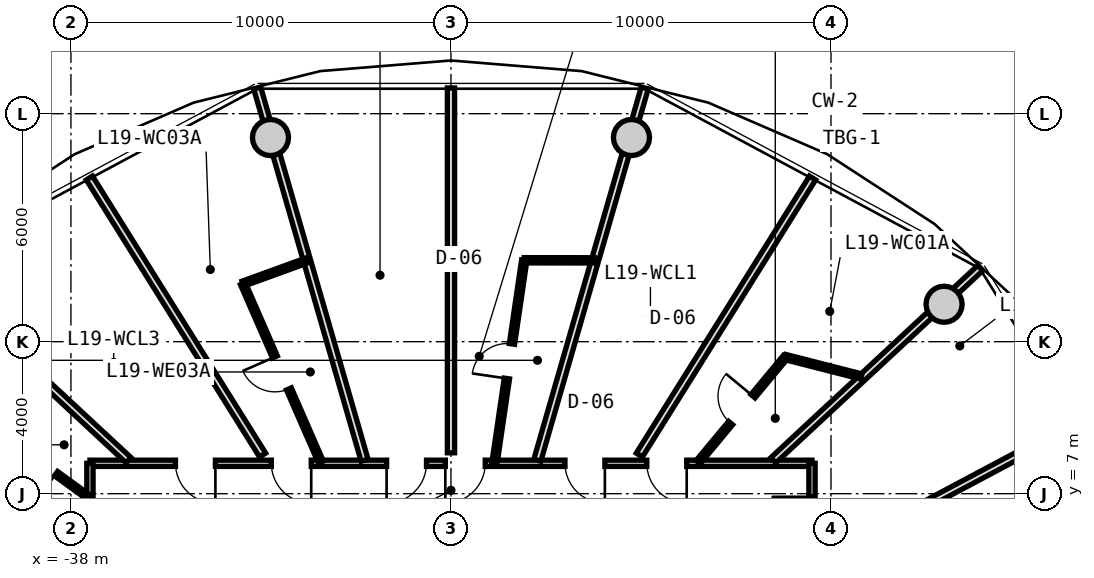
"""IFC4 building model, lengths in metres.
Left out: names, types, materials, properties, quantities, classifications, styles, units other than length and angle.
Written with IfcOpenShell. Run it as: python <this file> out.ifc"""

import sys

from ifc_helpers import new_model, si_unit, direction, frame, frame_2d, origin, origin_2d, place, context, subcontext, project, spatial, rectangle, circle, extrude, source, transform, mapped, element, fill, save


model = new_model("IFC4")
c1 = context("Model", 3, precision=1e-05, world=origin(), true_north=direction((0.0, 1.0)))
c2 = subcontext(c1, "Body", "Model", "MODEL_VIEW")
j1 = project(units=[si_unit("LENGTHUNIT", "METRE"), si_unit("PLANEANGLEUNIT", "RADIAN")], contexts=[c1])
p1 = place(None, origin())
s1 = spatial("IfcSite", under=j1, at=p1, CompositionType="ELEMENT")
p2 = place(p1, origin())
s2 = spatial("IfcBuilding", under=s1, at=p2, CompositionType="ELEMENT")
p3 = place(p2, frame((0.0, 0.0, 64.3)))
s3 = spatial("IfcBuildingStorey", under=s2, at=p3, CompositionType="ELEMENT", Elevation=64.3)
m1 = source(origin(), c2, "Body", "SweptSolid", [
    extrude(circle(Radius=0.475, at=origin_2d()), origin(), (0.0, 0.0, 1.0), 3.05),
])
for number, where, z_axis, x_axis in (
    (1, (-15.025, 11.985, 0.0), (0.0, 0.0, 1.0), (1.0, 0.0, 0.0)),
    (2, (-23.251, 16.373, 0.0), (0.0, 0.0, 1.0), (1.0, 0.0, 0.0)),
    (3, (-32.749, 16.373, 0.0), (0.0, 0.0, 1.0), (1.0, 0.0, 0.0)),
):
    element("IfcColumn", number, at=place(p3, frame(where, z_axis=z_axis, x_axis=x_axis)), inside=s3, PredefinedType="COLUMN", context=c2, shape_type="MappedRepresentation", body=[
        mapped(m1, transform((0.0, 0.0, 0.0), x_axis=(1.0, 0.0, 0.0), y_axis=(0.0, 1.0, 0.0), z_axis=(0.0, 0.0, 1.0), scale=1.0)),
    ])
m2 = source(origin(), c2, "Body", "SweptSolid", [
    extrude(rectangle(XDim=19.0, YDim=0.165, at=frame_2d((9.5, 0.0))), origin(), (0.0, 0.0, 1.0), 2.775),
])
p4 = place(p3, frame((-37.5, 7.8, 0.0), z_axis=(0.0, 0.0, 1.0), x_axis=(1.0, 0.0, 0.0)))
e4 = element("IfcWall", 4, at=p4, inside=s3, PredefinedType="PARTITIONING", context=c2, shape_type="MappedRepresentation", body=[
    mapped(m2, transform((0.0, 0.0, 0.0), x_axis=(1.0, 0.0, 0.0), y_axis=(0.0, 1.0, 0.0), z_axis=(0.0, 0.0, 1.0), scale=1.0)),
])
p5 = place(p4, frame((14.653, 0.0, 0.0)))
e5 = element("IfcOpeningElement", 5, at=p5, cuts=e4, PredefinedType="OPENING", context=c2, shape_type="SweptSolid", body=[
    extrude(rectangle(XDim=1.05, YDim=2.15, at=frame_2d((0.525, 1.075))), frame((0.0, 0.093, 0.0), z_axis=(0.0, -1.0, 0.0), x_axis=(1.0, 0.0, 0.0)), (0.0, 0.0, 1.0), 0.185),
])
p6 = place(p4, frame((12.5, 0.0, 0.0)))
e6 = element("IfcOpeningElement", 6, at=p6, cuts=e4, PredefinedType="OPENING", context=c2, shape_type="SweptSolid", body=[
    extrude(rectangle(XDim=1.05, YDim=2.15, at=frame_2d((0.525, 1.075))), frame((0.0, 0.093, 0.0), z_axis=(0.0, -1.0, 0.0), x_axis=(1.0, 0.0, 0.0)), (0.0, 0.0, 1.0), 0.185),
])
p7 = place(p4, frame((9.352, 0.0, 0.0)))
e7 = element("IfcOpeningElement", 7, at=p7, cuts=e4, PredefinedType="OPENING", context=c2, shape_type="SweptSolid", body=[
    extrude(rectangle(XDim=1.05, YDim=2.15, at=frame_2d((0.525, 1.075))), frame((0.0, 0.093, 0.0), z_axis=(0.0, -1.0, 0.0), x_axis=(1.0, 0.0, 0.0)), (0.0, 0.0, 1.0), 0.185),
])
p8 = place(p4, frame((7.806, 0.0, 0.0)))
e8 = element("IfcOpeningElement", 8, at=p8, cuts=e4, PredefinedType="OPENING", context=c2, shape_type="SweptSolid", body=[
    extrude(rectangle(XDim=1.05, YDim=2.15, at=frame_2d((0.525, 1.075))), frame((0.0, 0.093, 0.0), z_axis=(0.0, -1.0, 0.0), x_axis=(1.0, 0.0, 0.0)), (0.0, 0.0, 1.0), 0.185),
])
p9 = place(p4, frame((4.773, 0.0, 0.0)))
e9 = element("IfcOpeningElement", 9, at=p9, cuts=e4, PredefinedType="OPENING", context=c2, shape_type="SweptSolid", body=[
    extrude(rectangle(XDim=1.05, YDim=2.15, at=frame_2d((0.525, 1.075))), frame((0.0, 0.093, 0.0), z_axis=(0.0, -1.0, 0.0), x_axis=(1.0, 0.0, 0.0)), (0.0, 0.0, 1.0), 0.185),
])
p10 = place(p4, frame((2.251, 0.0, 0.0)))
e10 = element("IfcOpeningElement", 10, at=p10, cuts=e4, PredefinedType="OPENING", context=c2, shape_type="SweptSolid", body=[
    extrude(rectangle(XDim=1.05, YDim=2.15, at=frame_2d((0.525, 1.075))), frame((0.0, 0.093, 0.0), z_axis=(0.0, -1.0, 0.0), x_axis=(1.0, 0.0, 0.0)), (0.0, 0.0, 1.0), 0.185),
])
m3 = source(origin(), c2, "Body", "SweptSolid", [
    extrude(rectangle(XDim=15.6, YDim=0.165, at=frame_2d((7.8, 0.0))), origin(), (0.0, 0.0, 1.0), 2.775),
])
p11 = place(p3, frame((-37.5, -7.8, 0.0), z_axis=(0.0, 0.0, 1.0), x_axis=(0.0, 1.0, 0.0)))
e11 = element("IfcWall", 11, at=p11, inside=s3, PredefinedType="PARTITIONING", context=c2, shape_type="MappedRepresentation", body=[
    mapped(m3, transform((0.0, 0.0, 0.0), x_axis=(1.0, 0.0, 0.0), y_axis=(0.0, 1.0, 0.0), z_axis=(0.0, 0.0, 1.0), scale=1.0)),
])
p12 = place(p11, frame((7.812, 0.0, 0.0)))
e12 = element("IfcOpeningElement", 12, at=p12, cuts=e11, PredefinedType="OPENING", context=c2, shape_type="SweptSolid", body=[
    extrude(rectangle(XDim=1.05, YDim=2.15, at=frame_2d((0.525, 1.075))), frame((0.0, 0.093, 0.0), z_axis=(0.0, -1.0, 0.0), x_axis=(1.0, 0.0, 0.0)), (0.0, 0.0, 1.0), 0.185),
])
p13 = place(p11, frame((6.035, 0.0, 0.0)))
e13 = element("IfcOpeningElement", 13, at=p13, cuts=e11, PredefinedType="OPENING", context=c2, shape_type="SweptSolid", body=[
    extrude(rectangle(XDim=1.05, YDim=2.15, at=frame_2d((0.525, 1.075))), frame((0.0, 0.093, 0.0), z_axis=(0.0, -1.0, 0.0), x_axis=(1.0, 0.0, 0.0)), (0.0, 0.0, 1.0), 0.185),
])
p14 = place(p11, frame((2.826, 0.0, 0.0)))
e14 = element("IfcOpeningElement", 14, at=p14, cuts=e11, PredefinedType="OPENING", context=c2, shape_type="SweptSolid", body=[
    extrude(rectangle(XDim=1.05, YDim=2.15, at=frame_2d((0.525, 1.075))), frame((0.0, 0.093, 0.0), z_axis=(0.0, -1.0, 0.0), x_axis=(1.0, 0.0, 0.0)), (0.0, 0.0, 1.0), 0.185),
])
p15 = place(p11, frame((0.881, 0.0, 0.0)))
e15 = element("IfcOpeningElement", 15, at=p15, cuts=e11, PredefinedType="OPENING", context=c2, shape_type="SweptSolid", body=[
    extrude(rectangle(XDim=1.05, YDim=2.15, at=frame_2d((0.525, 1.075))), frame((0.0, 0.093, 0.0), z_axis=(0.0, -1.0, 0.0), x_axis=(1.0, 0.0, 0.0)), (0.0, 0.0, 1.0), 0.185),
])
p16 = place(p11, frame((13.293, 0.0, 0.0)))
e16 = element("IfcOpeningElement", 16, at=p16, cuts=e11, PredefinedType="OPENING", context=c2, shape_type="SweptSolid", body=[
    extrude(rectangle(XDim=1.05, YDim=2.15, at=frame_2d((0.525, 1.075))), frame((0.0, 0.093, 0.0), z_axis=(0.0, -1.0, 0.0), x_axis=(1.0, 0.0, 0.0)), (0.0, 0.0, 1.0), 0.185),
])
p17 = place(p11, frame((11.018, 0.0, 0.0)))
e17 = element("IfcOpeningElement", 17, at=p17, cuts=e11, PredefinedType="OPENING", context=c2, shape_type="SweptSolid", body=[
    extrude(rectangle(XDim=1.05, YDim=2.15, at=frame_2d((0.525, 1.075))), frame((0.0, 0.093, 0.0), z_axis=(0.0, -1.0, 0.0), x_axis=(1.0, 0.0, 0.0)), (0.0, 0.0, 1.0), 0.185),
])
p18 = place(p3, frame((-18.5, 7.8, 0.0), z_axis=(0.0, 0.0, 1.0), x_axis=(0.0, -1.0, 0.0)))
e18 = element("IfcWall", 18, at=p18, inside=s3, PredefinedType="PARTITIONING", context=c2, shape_type="MappedRepresentation", body=[
    mapped(m3, transform((0.0, 0.0, 0.0), x_axis=(1.0, 0.0, 0.0), y_axis=(0.0, 1.0, 0.0), z_axis=(0.0, 0.0, 1.0), scale=1.0)),
])
p19 = place(p18, frame((12.141, 0.0, 0.0)))
e19 = element("IfcOpeningElement", 19, at=p19, cuts=e18, PredefinedType="OPENING", context=c2, shape_type="SweptSolid", body=[
    extrude(rectangle(XDim=1.25, YDim=2.2, at=frame_2d((0.625, 1.1))), frame((0.0, 0.093, 0.0), z_axis=(0.0, -1.0, 0.0), x_axis=(1.0, 0.0, 0.0)), (0.0, 0.0, 1.0), 0.185),
])
p20 = place(p18, frame((7.175, 0.0, 0.0)))
e20 = element("IfcOpeningElement", 20, at=p20, cuts=e18, PredefinedType="OPENING", context=c2, shape_type="SweptSolid", body=[
    extrude(rectangle(XDim=1.25, YDim=2.2, at=frame_2d((0.625, 1.1))), frame((0.0, 0.093, 0.0), z_axis=(0.0, -1.0, 0.0), x_axis=(1.0, 0.0, 0.0)), (0.0, 0.0, 1.0), 0.185),
])
p21 = place(p18, frame((2.826, 0.0, 0.0)))
e21 = element("IfcOpeningElement", 21, at=p21, cuts=e18, PredefinedType="OPENING", context=c2, shape_type="SweptSolid", body=[
    extrude(rectangle(XDim=1.05, YDim=2.15, at=frame_2d((0.525, 1.075))), frame((0.0, 0.093, 0.0), z_axis=(0.0, -1.0, 0.0), x_axis=(1.0, 0.0, 0.0)), (0.0, 0.0, 1.0), 0.185),
])
p22 = place(p18, frame((0.881, 0.0, 0.0)))
e22 = element("IfcOpeningElement", 22, at=p22, cuts=e18, PredefinedType="OPENING", context=c2, shape_type="SweptSolid", body=[
    extrude(rectangle(XDim=1.05, YDim=2.15, at=frame_2d((0.525, 1.075))), frame((0.0, 0.093, 0.0), z_axis=(0.0, -1.0, 0.0), x_axis=(1.0, 0.0, 0.0)), (0.0, 0.0, 1.0), 0.185),
])
m4 = source(origin(), c2, "Body", "SweptSolid", [
    extrude(rectangle(XDim=7.435, YDim=0.19, at=frame_2d((3.717, 0.0))), origin(), (0.0, 0.0, 1.0), 2.225),
])
p23 = place(p3, frame((-19.517, 7.88, 0.0), z_axis=(0.0, 0.0, 1.0), x_axis=(0.732651956848, 0.680603489652, 0.0)))
e23 = element("IfcWall", 23, at=p23, inside=s3, PredefinedType="PARTITIONING", context=c2, shape_type="MappedRepresentation", body=[
    mapped(m4, transform((0.0, 0.0, 0.0), x_axis=(1.0, 0.0, 0.0), y_axis=(0.0, 1.0, 0.0), z_axis=(0.0, 0.0, 1.0), scale=1.0)),
])
m5 = source(origin(), c2, "Body", "SweptSolid", [
    extrude(rectangle(XDim=7.677, YDim=0.19, at=frame_2d((3.838, 0.0))), origin(), (0.0, 0.0, 1.0), 2.775),
])
p24 = place(p3, frame((-18.297, 5.231, 0.0), z_axis=(0.0, 0.0, 1.0), x_axis=(0.882725057546, 0.469889851753, 0.0)))
e24 = element("IfcWall", 24, at=p24, inside=s3, PredefinedType="PARTITIONING", context=c2, shape_type="MappedRepresentation", body=[
    mapped(m5, transform((0.0, 0.0, 0.0), x_axis=(1.0, 0.0, 0.0), y_axis=(0.0, 1.0, 0.0), z_axis=(0.0, 0.0, 1.0), scale=1.0)),
])
m6 = source(origin(), c2, "Body", "SweptSolid", [
    extrude(rectangle(XDim=10.196, YDim=0.19, at=frame_2d((5.098, 0.0))), origin(), (0.0, 0.0, 1.0), 2.225),
])
p25 = place(p3, frame((-25.727, 7.88, 0.0), z_axis=(0.0, 0.0, 1.0), x_axis=(0.277136420347, 0.960830580549, 0.0)))
e25 = element("IfcWall", 25, at=p25, inside=s3, PredefinedType="PARTITIONING", context=c2, shape_type="MappedRepresentation", body=[
    mapped(m6, transform((0.0, 0.0, 0.0), x_axis=(1.0, 0.0, 0.0), y_axis=(0.0, 1.0, 0.0), z_axis=(0.0, 0.0, 1.0), scale=1.0)),
])
m7 = source(origin(), c2, "Body", "SweptSolid", [
    extrude(rectangle(XDim=8.598, YDim=0.19, at=frame_2d((4.299, 0.0))), origin(), (0.0, 0.0, 1.0), 2.775),
])
p26 = place(p3, frame((-23.043, 8.017, 0.0), z_axis=(0.0, 0.0, 1.0), x_axis=(0.530039776395, 0.847972779893, 0.0)))
e26 = element("IfcWall", 26, at=p26, inside=s3, PredefinedType="PARTITIONING", context=c2, shape_type="MappedRepresentation", body=[
    mapped(m7, transform((0.0, 0.0, 0.0), x_axis=(1.0, 0.0, 0.0), y_axis=(0.0, 1.0, 0.0), z_axis=(0.0, 0.0, 1.0), scale=1.0)),
])
m8 = source(origin(), c2, "Body", "SweptSolid", [
    extrude(rectangle(XDim=3.594, YDim=0.14, at=frame_2d((1.797, 0.0))), origin(), (0.0, 0.0, 1.0), 2.775),
])
p27 = place(p3, frame((-21.496, 7.83, 0.0), z_axis=(0.0, 0.0, 1.0), x_axis=(0.639001147083, 0.769205781326, 0.0)))
e27 = element("IfcWall", 27, at=p27, inside=s3, PredefinedType="PARTITIONING", context=c2, shape_type="MappedRepresentation", body=[
    mapped(m8, transform((0.0, 0.0, 0.0), x_axis=(1.0, 0.0, 0.0), y_axis=(0.0, 1.0, 0.0), z_axis=(0.0, 0.0, 1.0), scale=1.0)),
])
p28 = place(p27, frame((1.337, 0.0, 0.0)))
e28 = element("IfcOpeningElement", 28, at=p28, cuts=e27, PredefinedType="OPENING", context=c2, shape_type="SweptSolid", body=[
    extrude(rectangle(XDim=0.92, YDim=2.1, at=frame_2d((0.46, 1.05))), frame((0.0, 0.08, 0.0), z_axis=(0.0, -1.0, 0.0), x_axis=(1.0, 0.0, 0.0)), (0.0, 0.0, 1.0), 0.16),
])
m9 = source(origin(), c2, "Body", "SweptSolid", [
    extrude(rectangle(XDim=2.062, YDim=0.14, at=frame_2d((1.031, 0.0))), origin(), (0.0, 0.0, 1.0), 2.415),
])
p29 = place(p3, frame((-19.199, 10.595, 0.0), z_axis=(0.0, 0.0, 1.0), x_axis=(0.968776253543, -0.247936626121, 0.0)))
e29 = element("IfcWall", 29, at=p29, inside=s3, PredefinedType="PARTITIONING", context=c2, shape_type="MappedRepresentation", body=[
    mapped(m9, transform((0.0, 0.0, 0.0), x_axis=(1.0, 0.0, 0.0), y_axis=(0.0, 1.0, 0.0), z_axis=(0.0, 0.0, 1.0), scale=1.0)),
])
p30 = place(p3, frame((-30.273, 7.88, 0.0), z_axis=(0.0, 0.0, 1.0), x_axis=(-0.277136420347, 0.960830580549, 0.0)))
e30 = element("IfcWall", 30, at=p30, inside=s3, PredefinedType="PARTITIONING", context=c2, shape_type="MappedRepresentation", body=[
    mapped(m6, transform((0.0, 0.0, 0.0), x_axis=(1.0, 0.0, 0.0), y_axis=(0.0, 1.0, 0.0), z_axis=(0.0, 0.0, 1.0), scale=1.0)),
])
m10 = source(origin(), c2, "Body", "SweptSolid", [
    extrude(rectangle(XDim=9.601, YDim=0.19, at=frame_2d((4.8, 0.0))), origin(), (0.0, 0.0, 1.0), 2.775),
])
p31 = place(p3, frame((-28.0, 8.076, 0.0), z_axis=(0.0, 0.0, 1.0), x_axis=(0.0, 1.0, 0.0)))
e31 = element("IfcWall", 31, at=p31, inside=s3, PredefinedType="PARTITIONING", context=c2, shape_type="MappedRepresentation", body=[
    mapped(m10, transform((0.0, 0.0, 0.0), x_axis=(1.0, 0.0, 0.0), y_axis=(0.0, 1.0, 0.0), z_axis=(0.0, 0.0, 1.0), scale=1.0)),
])
m11 = source(origin(), c2, "Body", "SweptSolid", [
    extrude(rectangle(XDim=5.37, YDim=0.14, at=frame_2d((2.685, 0.0))), origin(), (0.0, 0.0, 1.0), 2.775),
])
p32 = place(p3, frame((-26.851, 7.83, 0.0), z_axis=(0.0, 0.0, 1.0), x_axis=(0.145131397853, 0.989412389935, 0.0)))
e32 = element("IfcWall", 32, at=p32, inside=s3, PredefinedType="PARTITIONING", context=c2, shape_type="MappedRepresentation", body=[
    mapped(m11, transform((0.0, 0.0, 0.0), x_axis=(1.0, 0.0, 0.0), y_axis=(0.0, 1.0, 0.0), z_axis=(0.0, 0.0, 1.0), scale=1.0)),
])
p33 = place(p32, frame((2.225, 0.0, 0.0)))
e33 = element("IfcOpeningElement", 33, at=p33, cuts=e32, PredefinedType="OPENING", context=c2, shape_type="SweptSolid", body=[
    extrude(rectangle(XDim=0.92, YDim=2.1, at=frame_2d((0.46, 1.05))), frame((0.0, 0.08, 0.0), z_axis=(0.0, -1.0, 0.0), x_axis=(1.0, 0.0, 0.0)), (0.0, 0.0, 1.0), 0.16),
])
m12 = source(origin(), c2, "Body", "SweptSolid", [
    extrude(rectangle(XDim=1.843, YDim=0.14, at=frame_2d((0.921, 0.0))), origin(), (0.0, 0.0, 1.0), 2.775),
])
p34 = place(p3, frame((-26.072, 13.143, 0.0), z_axis=(0.0, 0.0, 1.0), x_axis=(0.999998937801, -0.001457531246, 0.0)))
e34 = element("IfcWall", 34, at=p34, inside=s3, PredefinedType="PARTITIONING", context=c2, shape_type="MappedRepresentation", body=[
    mapped(m12, transform((0.0, 0.0, 0.0), x_axis=(1.0, 0.0, 0.0), y_axis=(0.0, 1.0, 0.0), z_axis=(0.0, 0.0, 1.0), scale=1.0)),
])
p35 = place(p3, frame((-36.483, 7.88, 0.0), z_axis=(0.0, 0.0, 1.0), x_axis=(-0.732651956848, 0.680603489652, 0.0)))
e35 = element("IfcWall", 35, at=p35, inside=s3, PredefinedType="PARTITIONING", context=c2, shape_type="MappedRepresentation", body=[
    mapped(m4, transform((0.0, 0.0, 0.0), x_axis=(1.0, 0.0, 0.0), y_axis=(0.0, 1.0, 0.0), z_axis=(0.0, 0.0, 1.0), scale=1.0)),
])
p36 = place(p3, frame((-32.957, 8.017, 0.0), z_axis=(0.0, 0.0, 1.0), x_axis=(-0.530039776395, 0.847972779893, 0.0)))
e36 = element("IfcWall", 36, at=p36, inside=s3, PredefinedType="PARTITIONING", context=c2, shape_type="MappedRepresentation", body=[
    mapped(m7, transform((0.0, 0.0, 0.0), x_axis=(1.0, 0.0, 0.0), y_axis=(0.0, 1.0, 0.0), z_axis=(0.0, 0.0, 1.0), scale=1.0)),
])
m13 = source(origin(), c2, "Body", "SweptSolid", [
    extrude(rectangle(XDim=5.126, YDim=0.14, at=frame_2d((2.563, 0.0))), origin(), (0.0, 0.0, 1.0), 2.775),
])
p37 = place(p3, frame((-31.422, 7.83, 0.0), z_axis=(0.0, 0.0, 1.0), x_axis=(-0.400473994842, 0.916308124735, 0.0)))
e37 = element("IfcWall", 37, at=p37, inside=s3, PredefinedType="PARTITIONING", context=c2, shape_type="MappedRepresentation", body=[
    mapped(m13, transform((0.0, 0.0, 0.0), x_axis=(1.0, 0.0, 0.0), y_axis=(0.0, 1.0, 0.0), z_axis=(0.0, 0.0, 1.0), scale=1.0)),
])
p38 = place(p37, frame((2.103, 0.0, 0.0)))
e38 = element("IfcOpeningElement", 38, at=p38, cuts=e37, PredefinedType="OPENING", context=c2, shape_type="SweptSolid", body=[
    extrude(rectangle(XDim=0.92, YDim=2.1, at=frame_2d((0.46, 1.05))), frame((0.0, 0.08, 0.0), z_axis=(0.0, -1.0, 0.0), x_axis=(1.0, 0.0, 0.0)), (0.0, 0.0, 1.0), 0.16),
])
m14 = source(origin(), c2, "Body", "SweptSolid", [
    extrude(rectangle(XDim=1.811, YDim=0.14, at=frame_2d((0.906, 0.0))), origin(), (0.0, 0.0, 1.0), 2.775),
])
p39 = place(p3, frame((-33.475, 12.527, 0.0), z_axis=(0.0, 0.0, 1.0), x_axis=(0.940009682452, 0.341147764021, 0.0)))
e39 = element("IfcWall", 39, at=p39, inside=s3, PredefinedType="PARTITIONING", context=c2, shape_type="MappedRepresentation", body=[
    mapped(m14, transform((0.0, 0.0, 0.0), x_axis=(1.0, 0.0, 0.0), y_axis=(0.0, 1.0, 0.0), z_axis=(0.0, 0.0, 1.0), scale=1.0)),
])
p40 = place(p3, frame((-37.703, 5.231, 0.0), z_axis=(0.0, 0.0, 1.0), x_axis=(-0.882725057546, 0.469889851753, 0.0)))
e40 = element("IfcWall", 40, at=p40, inside=s3, PredefinedType="PARTITIONING", context=c2, shape_type="MappedRepresentation", body=[
    mapped(m5, transform((0.0, 0.0, 0.0), x_axis=(1.0, 0.0, 0.0), y_axis=(0.0, 1.0, 0.0), z_axis=(0.0, 0.0, 1.0), scale=1.0)),
])
m15 = source(origin(), c2, "Body", "SweptSolid", [
    extrude(rectangle(XDim=3.051, YDim=0.14, at=frame_2d((1.525, 0.0))), origin(), (0.0, 0.0, 1.0), 2.775),
])
p41 = place(p3, frame((-37.53, 6.903, 0.0), z_axis=(0.0, 0.0, 1.0), x_axis=(-0.809849031404, 0.586638343729, 0.0)))
e41 = element("IfcWall", 41, at=p41, inside=s3, PredefinedType="PARTITIONING", context=c2, shape_type="MappedRepresentation", body=[
    mapped(m15, transform((0.0, 0.0, 0.0), x_axis=(1.0, 0.0, 0.0), y_axis=(0.0, 1.0, 0.0), z_axis=(0.0, 0.0, 1.0), scale=1.0)),
])
p42 = place(p41, frame((1.065, 0.0, 0.0)))
e42 = element("IfcOpeningElement", 42, at=p42, cuts=e41, PredefinedType="OPENING", context=c2, shape_type="SweptSolid", body=[
    extrude(rectangle(XDim=0.92, YDim=2.1, at=frame_2d((0.46, 1.05))), frame((0.0, 0.08, 0.0), z_axis=(0.0, -1.0, 0.0), x_axis=(1.0, 0.0, 0.0)), (0.0, 0.0, 1.0), 0.16),
])
m16 = source(origin(), c2, "Body", "SweptSolid", [
    extrude(rectangle(XDim=1.05, YDim=2.15, at=frame_2d((0.525, 1.075))), frame((0.0, 0.025, 0.0), z_axis=(0.0, -1.0, 0.0), x_axis=(1.0, 0.0, 0.0)), (0.0, 0.0, 1.0), 0.05),
])
p43 = place(p22, frame((1.05, 0.0, 0.0), z_axis=(0.0, 0.0, 1.0), x_axis=(-1.0, 0.0, 0.0)))
e43 = element("IfcDoor", 43, at=p43, inside=s3, OperationType="SINGLE_SWING_RIGHT", PredefinedType="DOOR", context=c2, shape_type="MappedRepresentation", body=[
    mapped(m16, transform((0.0, 0.0, 0.0), x_axis=(1.0, 0.0, 0.0), y_axis=(0.0, 1.0, 0.0), z_axis=(0.0, 0.0, 1.0), scale=1.0)),
])
fill(e22, e43)
p44 = place(p5, frame((1.05, 0.0, 0.0), z_axis=(0.0, 0.0, 1.0), x_axis=(-1.0, 0.0, 0.0)))
e44 = element("IfcDoor", 44, at=p44, inside=s3, OperationType="SINGLE_SWING_LEFT", PredefinedType="DOOR", context=c2, shape_type="MappedRepresentation", body=[
    mapped(m16, transform((0.0, 0.0, 0.0), x_axis=(1.0, 0.0, 0.0), y_axis=(0.0, 1.0, 0.0), z_axis=(0.0, 0.0, 1.0), scale=1.0)),
])
fill(e5, e44)
m17 = source(origin(), c2, "Body", "SweptSolid", [
    extrude(rectangle(XDim=0.92, YDim=2.1, at=frame_2d((0.46, 1.05))), frame((0.0, 0.025, 0.0), z_axis=(0.0, -1.0, 0.0), x_axis=(1.0, 0.0, 0.0)), (0.0, 0.0, 1.0), 0.05),
])
p45 = place(p28, origin())
e45 = element("IfcDoor", 45, at=p45, inside=s3, OperationType="SINGLE_SWING_RIGHT", PredefinedType="DOOR", context=c2, shape_type="MappedRepresentation", body=[
    mapped(m17, transform((0.0, 0.0, 0.0), x_axis=(1.0, 0.0, 0.0), y_axis=(0.0, 1.0, 0.0), z_axis=(0.0, 0.0, 1.0), scale=1.0)),
])
fill(e28, e45)
p46 = place(p6, frame((1.05, 0.0, 0.0), z_axis=(0.0, 0.0, 1.0), x_axis=(-1.0, 0.0, 0.0)))
e46 = element("IfcDoor", 46, at=p46, inside=s3, OperationType="SINGLE_SWING_LEFT", PredefinedType="DOOR", context=c2, shape_type="MappedRepresentation", body=[
    mapped(m16, transform((0.0, 0.0, 0.0), x_axis=(1.0, 0.0, 0.0), y_axis=(0.0, 1.0, 0.0), z_axis=(0.0, 0.0, 1.0), scale=1.0)),
])
fill(e6, e46)
p47 = place(p7, frame((1.05, 0.0, 0.0), z_axis=(0.0, 0.0, 1.0), x_axis=(-1.0, 0.0, 0.0)))
e47 = element("IfcDoor", 47, at=p47, inside=s3, OperationType="SINGLE_SWING_RIGHT", PredefinedType="DOOR", context=c2, shape_type="MappedRepresentation", body=[
    mapped(m16, transform((0.0, 0.0, 0.0), x_axis=(1.0, 0.0, 0.0), y_axis=(0.0, 1.0, 0.0), z_axis=(0.0, 0.0, 1.0), scale=1.0)),
])
fill(e7, e47)
p48 = place(p33, origin())
e48 = element("IfcDoor", 48, at=p48, inside=s3, OperationType="SINGLE_SWING_LEFT", PredefinedType="DOOR", context=c2, shape_type="MappedRepresentation", body=[
    mapped(m17, transform((0.0, 0.0, 0.0), x_axis=(1.0, 0.0, 0.0), y_axis=(0.0, 1.0, 0.0), z_axis=(0.0, 0.0, 1.0), scale=1.0)),
])
fill(e33, e48)
p49 = place(p8, frame((1.05, 0.0, 0.0), z_axis=(0.0, 0.0, 1.0), x_axis=(-1.0, 0.0, 0.0)))
e49 = element("IfcDoor", 49, at=p49, inside=s3, OperationType="SINGLE_SWING_RIGHT", PredefinedType="DOOR", context=c2, shape_type="MappedRepresentation", body=[
    mapped(m16, transform((0.0, 0.0, 0.0), x_axis=(1.0, 0.0, 0.0), y_axis=(0.0, 1.0, 0.0), z_axis=(0.0, 0.0, 1.0), scale=1.0)),
])
fill(e8, e49)
p50 = place(p9, frame((1.05, 0.0, 0.0), z_axis=(0.0, 0.0, 1.0), x_axis=(-1.0, 0.0, 0.0)))
e50 = element("IfcDoor", 50, at=p50, inside=s3, OperationType="SINGLE_SWING_LEFT", PredefinedType="DOOR", context=c2, shape_type="MappedRepresentation", body=[
    mapped(m16, transform((0.0, 0.0, 0.0), x_axis=(1.0, 0.0, 0.0), y_axis=(0.0, 1.0, 0.0), z_axis=(0.0, 0.0, 1.0), scale=1.0)),
])
fill(e9, e50)
p51 = place(p38, origin())
e51 = element("IfcDoor", 51, at=p51, inside=s3, OperationType="SINGLE_SWING_RIGHT", PredefinedType="DOOR", context=c2, shape_type="MappedRepresentation", body=[
    mapped(m17, transform((0.0, 0.0, 0.0), x_axis=(1.0, 0.0, 0.0), y_axis=(0.0, 1.0, 0.0), z_axis=(0.0, 0.0, 1.0), scale=1.0)),
])
fill(e38, e51)
p52 = place(p10, frame((1.05, 0.0, 0.0), z_axis=(0.0, 0.0, 1.0), x_axis=(-1.0, 0.0, 0.0)))
e52 = element("IfcDoor", 52, at=p52, inside=s3, OperationType="SINGLE_SWING_LEFT", PredefinedType="DOOR", context=c2, shape_type="MappedRepresentation", body=[
    mapped(m16, transform((0.0, 0.0, 0.0), x_axis=(1.0, 0.0, 0.0), y_axis=(0.0, 1.0, 0.0), z_axis=(0.0, 0.0, 1.0), scale=1.0)),
])
fill(e10, e52)
p53 = place(p42, origin())
e53 = element("IfcDoor", 53, at=p53, inside=s3, OperationType="SINGLE_SWING_LEFT", PredefinedType="DOOR", context=c2, shape_type="MappedRepresentation", body=[
    mapped(m17, transform((0.0, 0.0, 0.0), x_axis=(1.0, 0.0, 0.0), y_axis=(0.0, 1.0, 0.0), z_axis=(0.0, 0.0, 1.0), scale=1.0)),
])
fill(e42, e53)
save(model, sys.argv[1])
